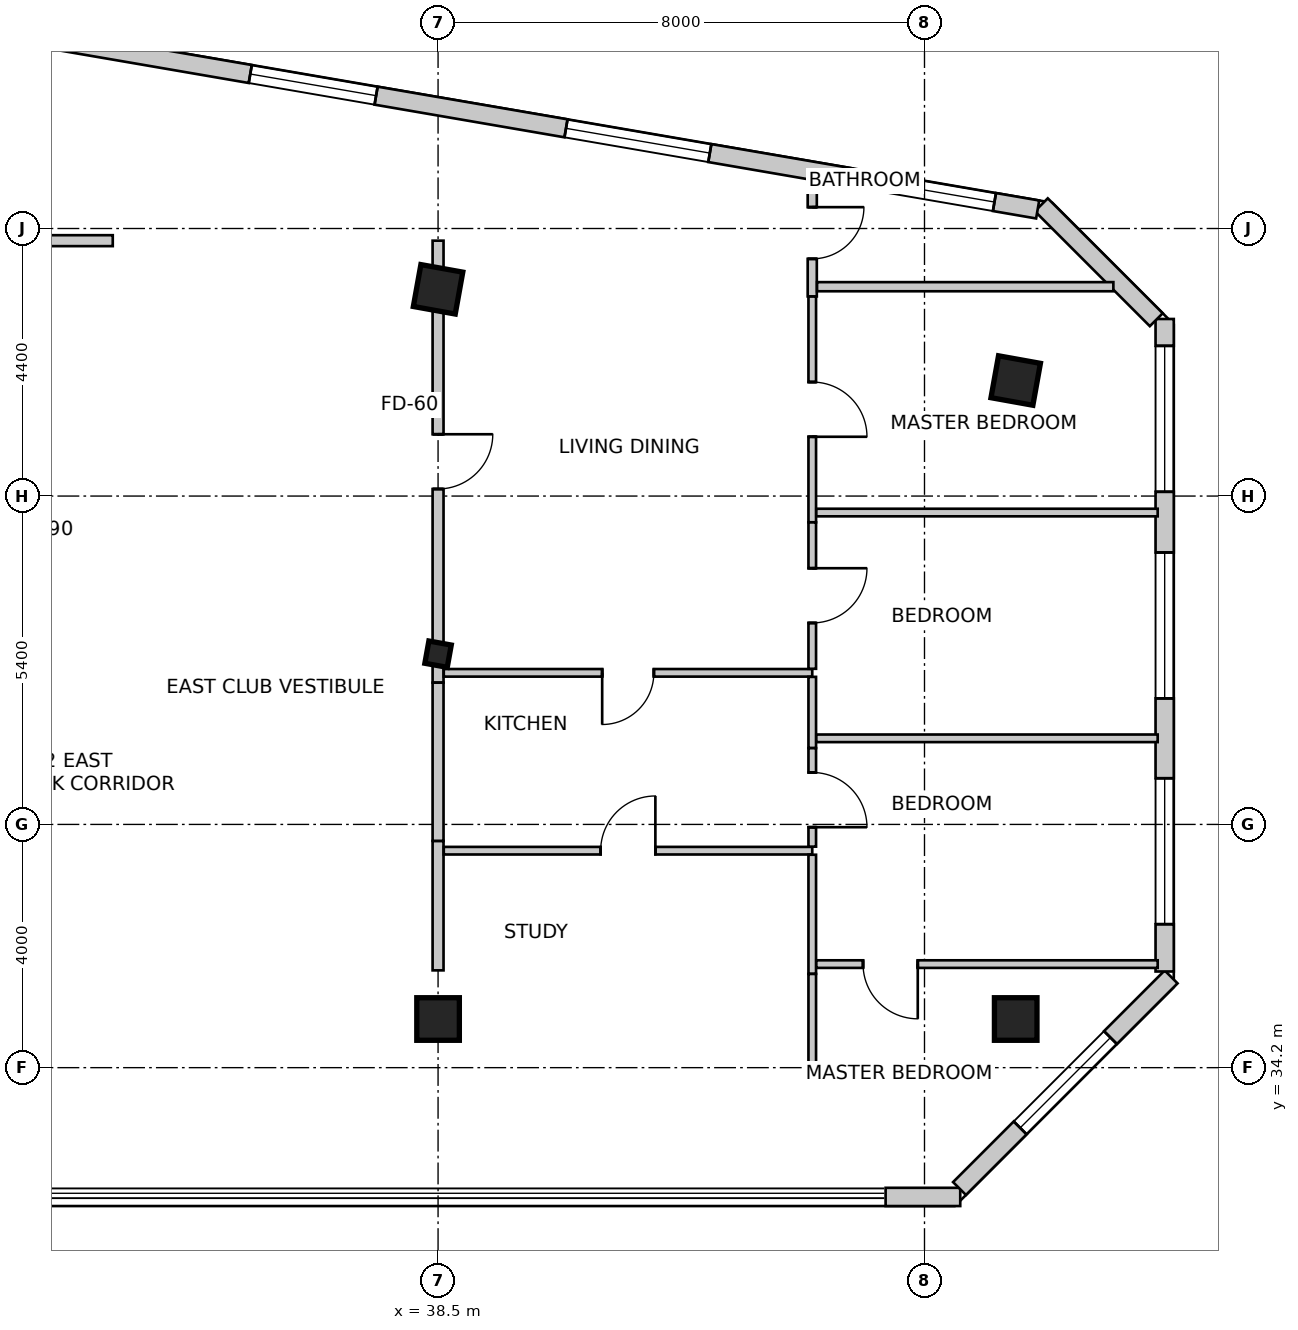
"""IFC4 building model, lengths in metres.
Left out: names, types, materials, properties, quantities, classifications, styles, units other than length and angle.
Written with IfcOpenShell. Run it as: python <this file> out.ifc"""

import sys

from ifc_helpers import new_model, si_unit, direction, frame, frame_2d, origin, origin_2d, place, context, subcontext, project, spatial, rectangle, i_section, extrude, source, transform, mapped, element, fill, save


model = new_model("IFC4")
c1 = context("Model", 3, precision=1e-05, world=origin(), true_north=direction((0.0, 1.0)))
c2 = subcontext(c1, "Body", "Model", "MODEL_VIEW")
j1 = project(units=[si_unit("LENGTHUNIT", "METRE"), si_unit("PLANEANGLEUNIT", "RADIAN")], contexts=[c1])
p1 = place(None, origin())
s1 = spatial("IfcSite", under=j1, at=p1, CompositionType="ELEMENT")
p2 = place(p1, origin())
s2 = spatial("IfcBuilding", under=s1, at=p2, CompositionType="ELEMENT")
p3 = place(p2, frame((0.0, 0.0, 207.9)))
s3 = spatial("IfcBuildingStorey", under=s2, at=p3, CompositionType="ELEMENT", Elevation=207.9)
m1 = source(origin(), c2, "Body", "SweptSolid", [
    extrude(rectangle(XDim=0.7, YDim=0.7, at=origin_2d()), origin(), (0.0, 0.0, 1.0), 3.5),
])
for number, where, z_axis, x_axis in (
    (1, (38.5, 47.0, 0.0), (0.0, 0.0, 1.0), (0.984, -0.177, 0.0)),
    (2, (48.0, 45.5, 0.0), (0.0, 0.0, 1.0), (0.984, -0.177, 0.0)),
    (3, (38.5, 35.0, 0.0), (0.0, 0.0, 1.0), (1.0, 0.0, 0.0)),
    (4, (48.0, 35.0, 0.0), (0.0, 0.0, 1.0), (1.0, 0.0, 0.0)),
):
    element("IfcColumn", number, at=place(p3, frame(where, z_axis=z_axis, x_axis=x_axis)), inside=s3, PredefinedType="COLUMN", context=c2, shape_type="MappedRepresentation", body=[
        mapped(m1, transform((0.0, 0.0, 0.0), scale=1.0)),
    ])
m2 = source(origin(), c2, "Body", "SweptSolid", [
    extrude(i_section(OverallWidth=0.374, OverallDepth=0.372, WebThickness=0.016, FlangeThickness=0.026, FilletRadius=0.015, at=origin_2d()), origin(), (0.0, 0.0, 1.0), 3.5),
])
p4 = place(p3, frame((38.5, 41.0, 0.0), z_axis=(0.0, 0.0, 1.0), x_axis=(0.984195607969, -0.17708474032, 0.0)))
e5 = element("IfcColumn", 5, at=p4, inside=s3, PredefinedType="COLUMN", context=c2, shape_type="MappedRepresentation", body=[
    mapped(m2, transform((0.0, 0.0, 0.0), scale=1.0)),
])
p5 = place(p3, frame((45.86, 32.074, 0.0), z_axis=(0.0, 0.0, 1.0), x_axis=(1.0, 0.0, 0.0)))
e6 = element("IfcWall", 6, at=p5, inside=s3, PredefinedType="SOLIDWALL", context=c2, shape_type="SweptSolid", body=[
    extrude(rectangle(XDim=1.228, YDim=0.3, at=frame_2d((0.614, 0.0))), origin(), (0.0, 0.0, 1.0), 3.2),
])
p6 = place(p3, frame((47.076, 32.212, 0.0), z_axis=(0.0, 0.0, 1.0), x_axis=(0.707106781187, 0.707106781187, 0.0)))
e7 = element("IfcWall", 7, at=p6, inside=s3, PredefinedType="SOLIDWALL", context=c2, shape_type="SweptSolid", body=[
    extrude(rectangle(XDim=4.922, YDim=0.3, at=frame_2d((2.461, 0.0))), origin(), (0.0, 0.0, 1.0), 3.2),
])
m3 = source(origin(), c2, "Body", "SweptSolid", [
    extrude(rectangle(XDim=2.1, YDim=2.0, at=frame_2d((1.05, 1.0))), frame((0.0, 0.16, 0.0), z_axis=(0.0, -1.0, 0.0), x_axis=(1.0, 0.0, 0.0)), (0.0, 0.0, 1.0), 0.32),
])
p7 = place(p6, frame((1.411, 0.0, 0.85)))
e8 = element("IfcOpeningElement", 8, at=p7, cuts=e7, PredefinedType="OPENING", context=c2, shape_type="MappedRepresentation", body=[
    mapped(m3, transform((0.0, 0.0, 0.0), scale=1.0)),
])
p8 = place(p3, frame((50.45, 35.781, 0.0), z_axis=(0.0, 0.0, 1.0), x_axis=(0.0, 1.0, 0.0)))
e9 = element("IfcWall", 9, at=p8, inside=s3, PredefinedType="SOLIDWALL", context=c2, shape_type="SweptSolid", body=[
    extrude(rectangle(XDim=10.731, YDim=0.3, at=frame_2d((5.365, 0.0))), origin(), (0.0, 0.0, 1.0), 3.2),
])
m4 = source(origin(), c2, "Body", "SweptSolid", [
    extrude(rectangle(XDim=2.4, YDim=2.2, at=frame_2d((1.2, 1.1))), frame((0.0, 0.16, 0.0), z_axis=(0.0, -1.0, 0.0), x_axis=(1.0, 0.0, 0.0)), (0.0, 0.0, 1.0), 0.32),
])
p9 = place(p8, frame((0.778, 0.0, 0.85)))
e10 = element("IfcOpeningElement", 10, at=p9, cuts=e9, PredefinedType="OPENING", context=c2, shape_type="MappedRepresentation", body=[
    mapped(m4, transform((0.0, 0.0, 0.0), scale=1.0)),
])
p10 = place(p8, frame((4.491, 0.0, 0.85)))
e11 = element("IfcOpeningElement", 11, at=p10, cuts=e9, PredefinedType="OPENING", context=c2, shape_type="MappedRepresentation", body=[
    mapped(m4, transform((0.0, 0.0, 0.0), scale=1.0)),
])
p11 = place(p8, frame((7.889, 0.0, 0.85)))
e12 = element("IfcOpeningElement", 12, at=p11, cuts=e9, PredefinedType="OPENING", context=c2, shape_type="MappedRepresentation", body=[
    mapped(m4, transform((0.0, 0.0, 0.0), scale=1.0)),
])
p12 = place(p3, frame((50.312, 46.5, 0.0), z_axis=(0.0, 0.0, 1.0), x_axis=(-0.707106781187, 0.707106781187, 0.0)))
e13 = element("IfcWall", 13, at=p12, inside=s3, PredefinedType="SOLIDWALL", context=c2, shape_type="SweptSolid", body=[
    extrude(rectangle(XDim=2.673, YDim=0.3, at=frame_2d((1.337, 0.0))), origin(), (0.0, 0.0, 1.0), 3.2),
])
p13 = place(p3, frame((48.361, 48.313, 0.0), z_axis=(0.0, 0.0, 1.0), x_axis=(-0.985523113069, 0.169541126597, 0.0)))
e14 = element("IfcWall", 14, at=p13, inside=s3, PredefinedType="SOLIDWALL", context=c2, shape_type="SweptSolid", body=[
    extrude(rectangle(XDim=26.866, YDim=0.3, at=frame_2d((13.433, 0.0))), origin(), (0.0, 0.0, 1.0), 3.2),
])
p14 = place(p13, frame((0.721, 0.0, 0.85)))
e15 = element("IfcOpeningElement", 15, at=p14, cuts=e14, PredefinedType="OPENING", context=c2, shape_type="MappedRepresentation", body=[
    mapped(m4, transform((0.0, 0.0, 0.0), scale=1.0)),
])
p15 = place(p13, frame((5.471, 0.0, 0.85)))
e16 = element("IfcOpeningElement", 16, at=p15, cuts=e14, PredefinedType="OPENING", context=c2, shape_type="MappedRepresentation", body=[
    mapped(m4, transform((0.0, 0.0, 0.0), scale=1.0)),
])
p16 = place(p13, frame((11.04, 0.0, 0.85)))
e17 = element("IfcOpeningElement", 17, at=p16, cuts=e14, PredefinedType="OPENING", context=c2, shape_type="MappedRepresentation", body=[
    mapped(m3, transform((0.0, 0.0, 0.0), scale=1.0)),
])
p17 = place(p13, frame((16.308, 0.0, 0.85)))
e18 = element("IfcOpeningElement", 18, at=p17, cuts=e14, PredefinedType="OPENING", context=c2, shape_type="MappedRepresentation", body=[
    mapped(m4, transform((0.0, 0.0, 0.0), scale=1.0)),
])
p18 = place(p13, frame((21.368, 0.0, 0.85)))
e19 = element("IfcOpeningElement", 19, at=p18, cuts=e14, PredefinedType="OPENING", context=c2, shape_type="MappedRepresentation", body=[
    mapped(m4, transform((0.0, 0.0, 0.0), scale=1.0)),
])
m5 = source(origin(), c2, "Body", "SweptSolid", [
    extrude(rectangle(XDim=1.5, YDim=1.8, at=frame_2d((0.75, 0.9))), frame((0.0, 0.16, 0.0), z_axis=(0.0, -1.0, 0.0), x_axis=(1.0, 0.0, 0.0)), (0.0, 0.0, 1.0), 0.32),
])
p19 = place(p13, frame((24.983, 0.0, 0.85)))
e20 = element("IfcOpeningElement", 20, at=p19, cuts=e14, PredefinedType="OPENING", context=c2, shape_type="MappedRepresentation", body=[
    mapped(m5, transform((0.0, 0.0, 0.0), scale=1.0)),
])
p20 = place(p3, frame((28.362, 47.8, 0.0), z_axis=(0.0, 0.0, 1.0), x_axis=(1.0, 0.0, 0.0)))
e21 = element("IfcWall", 21, at=p20, inside=s3, PredefinedType="PARTITIONING", context=c2, shape_type="SweptSolid", body=[
    extrude(rectangle(XDim=4.788, YDim=0.18, at=frame_2d((2.394, 0.0))), origin(), (0.0, 0.0, 1.0), 2.729),
])
m6 = source(origin(), c2, "Body", "SweptSolid", [
    extrude(rectangle(XDim=0.85, YDim=2.15, at=frame_2d((0.425, 1.075))), frame((0.0, 0.1, 0.0), z_axis=(0.0, -1.0, 0.0), x_axis=(1.0, 0.0, 0.0)), (0.0, 0.0, 1.0), 0.2),
])
p21 = place(p20, frame((0.401, 0.0, 0.0)))
e22 = element("IfcOpeningElement", 22, at=p21, cuts=e21, PredefinedType="OPENING", context=c2, shape_type="MappedRepresentation", body=[
    mapped(m6, transform((0.0, 0.0, 0.0), scale=1.0)),
])
p22 = place(p3, frame((38.5, 37.928, 0.0), z_axis=(0.0, 0.0, 1.0), x_axis=(0.0, -1.0, 0.0)))
e23 = element("IfcWall", 23, at=p22, inside=s3, PredefinedType="PARTITIONING", context=c2, shape_type="SweptSolid", body=[
    extrude(rectangle(XDim=2.128, YDim=0.18, at=frame_2d((1.064, 0.0))), origin(), (0.0, 0.0, 1.0), 2.242),
])
p23 = place(p3, frame((38.5, 47.8, 0.0), z_axis=(0.0, 0.0, 1.0), x_axis=(0.0, -1.0, 0.0)))
e24 = element("IfcWall", 24, at=p23, inside=s3, PredefinedType="PARTITIONING", context=c2, shape_type="SweptSolid", body=[
    extrude(rectangle(XDim=7.267, YDim=0.18, at=frame_2d((3.634, 0.0))), origin(), (0.0, 0.0, 1.0), 2.242),
])
m7 = source(origin(), c2, "Body", "SweptSolid", [
    extrude(rectangle(XDim=0.9, YDim=2.15, at=frame_2d((0.45, 1.075))), frame((0.0, 0.1, 0.0), z_axis=(0.0, -1.0, 0.0), x_axis=(1.0, 0.0, 0.0)), (0.0, 0.0, 1.0), 0.2),
])
p24 = place(p23, frame((3.184, 0.0, 0.0)))
e25 = element("IfcOpeningElement", 25, at=p24, cuts=e24, PredefinedType="OPENING", context=c2, shape_type="MappedRepresentation", body=[
    mapped(m7, transform((0.0, 0.0, 0.0), scale=1.0)),
])
p25 = place(p3, frame((38.5, 40.531, 0.0), z_axis=(0.0, 0.0, 1.0), x_axis=(0.0, -1.0, 0.0)))
e26 = element("IfcWall", 26, at=p25, inside=s3, PredefinedType="PARTITIONING", context=c2, shape_type="SweptSolid", body=[
    extrude(rectangle(XDim=2.601, YDim=0.18, at=frame_2d((1.301, 0.0))), origin(), (0.0, 0.0, 1.0), 2.242),
])
p26 = place(p3, frame((38.594, 37.768, 0.0), z_axis=(0.0, 0.0, 1.0), x_axis=(1.0, 0.0, 0.0)))
e27 = element("IfcWall", 27, at=p26, inside=s3, PredefinedType="PARTITIONING", context=c2, shape_type="SweptSolid", body=[
    extrude(rectangle(XDim=6.06, YDim=0.125, at=frame_2d((3.03, 0.0))), origin(), (0.0, 0.0, 1.0), 2.242),
])
m8 = source(origin(), c2, "Body", "SweptSolid", [
    extrude(rectangle(XDim=0.9, YDim=2.15, at=frame_2d((0.45, 1.075))), frame((0.0, 0.073, 0.0), z_axis=(0.0, -1.0, 0.0), x_axis=(1.0, 0.0, 0.0)), (0.0, 0.0, 1.0), 0.145),
])
p27 = place(p26, frame((2.58, 0.0, 0.0)))
e28 = element("IfcOpeningElement", 28, at=p27, cuts=e27, PredefinedType="OPENING", context=c2, shape_type="MappedRepresentation", body=[
    mapped(m8, transform((0.0, 0.0, 0.0), scale=1.0)),
])
p28 = place(p3, frame((44.654, 37.701, 0.0), z_axis=(0.0, 0.0, 1.0), x_axis=(0.0, -1.0, 0.0)))
e29 = element("IfcWall", 29, at=p28, inside=s3, PredefinedType="PARTITIONING", context=c2, shape_type="SweptSolid", body=[
    extrude(rectangle(XDim=1.958, YDim=0.125, at=frame_2d((0.979, 0.0))), origin(), (0.0, 0.0, 1.0), 2.729),
])
p29 = place(p3, frame((44.654, 35.741, 0.0), z_axis=(0.0, 0.0, 1.0), x_axis=(0.0, -1.0, 0.0)))
e30 = element("IfcWall", 30, at=p29, inside=s3, PredefinedType="PARTITIONING", context=c2, shape_type="SweptSolid", body=[
    extrude(rectangle(XDim=1.573, YDim=0.125, at=frame_2d((0.787, 0.0))), origin(), (0.0, 0.0, 1.0), 2.492),
])
p30 = place(p3, frame((44.654, 40.693, 0.0), z_axis=(0.0, 0.0, 1.0), x_axis=(-1.0, 0.0, 0.0)))
e31 = element("IfcWall", 31, at=p30, inside=s3, PredefinedType="PARTITIONING", context=c2, shape_type="SweptSolid", body=[
    extrude(rectangle(XDim=6.06, YDim=0.125, at=frame_2d((3.03, 0.0))), origin(), (0.0, 0.0, 1.0), 2.242),
])
m9 = source(origin(), c2, "Body", "SweptSolid", [
    extrude(rectangle(XDim=0.85, YDim=2.15, at=frame_2d((0.425, 1.075))), frame((0.0, 0.073, 0.0), z_axis=(0.0, -1.0, 0.0), x_axis=(1.0, 0.0, 0.0)), (0.0, 0.0, 1.0), 0.145),
])
p31 = place(p30, frame((2.605, 0.0, 0.0)))
e32 = element("IfcOpeningElement", 32, at=p31, cuts=e31, PredefinedType="OPENING", context=c2, shape_type="MappedRepresentation", body=[
    mapped(m9, transform((0.0, 0.0, 0.0), scale=1.0)),
])
p32 = place(p3, frame((44.654, 48.834, 0.0), z_axis=(0.0, 0.0, 1.0), x_axis=(0.0, -1.0, 0.0)))
e33 = element("IfcWall", 33, at=p32, inside=s3, PredefinedType="PARTITIONING", context=c2, shape_type="SweptSolid", body=[
    extrude(rectangle(XDim=1.951, YDim=0.15, at=frame_2d((0.976, 0.0))), origin(), (0.0, 0.0, 1.0), 3.2),
])
m10 = source(origin(), c2, "Body", "SweptSolid", [
    extrude(rectangle(XDim=0.85, YDim=2.15, at=frame_2d((0.425, 1.075))), frame((0.0, 0.085, 0.0), z_axis=(0.0, -1.0, 0.0), x_axis=(1.0, 0.0, 0.0)), (0.0, 0.0, 1.0), 0.17),
])
p33 = place(p32, frame((0.483, 0.0, 0.0)))
e34 = element("IfcOpeningElement", 34, at=p33, cuts=e33, PredefinedType="OPENING", context=c2, shape_type="MappedRepresentation", body=[
    mapped(m10, transform((0.0, 0.0, 0.0), scale=1.0)),
])
p34 = place(p3, frame((44.654, 46.881, 0.0), z_axis=(0.0, 0.0, 1.0), x_axis=(0.0, -1.0, 0.0)))
e35 = element("IfcWall", 35, at=p34, inside=s3, PredefinedType="PARTITIONING", context=c2, shape_type="SweptSolid", body=[
    extrude(rectangle(XDim=3.712, YDim=0.125, at=frame_2d((1.856, 0.0))), origin(), (0.0, 0.0, 1.0), 2.492),
])
p35 = place(p34, frame((1.406, 0.0, 0.0)))
e36 = element("IfcOpeningElement", 36, at=p35, cuts=e35, PredefinedType="OPENING", context=c2, shape_type="MappedRepresentation", body=[
    mapped(m8, transform((0.0, 0.0, 0.0), scale=1.0)),
])
p36 = place(p3, frame((44.654, 43.167, 0.0), z_axis=(0.0, 0.0, 1.0), x_axis=(0.0, -1.0, 0.0)))
e37 = element("IfcWall", 37, at=p36, inside=s3, PredefinedType="PARTITIONING", context=c2, shape_type="SweptSolid", body=[
    extrude(rectangle(XDim=2.407, YDim=0.125, at=frame_2d((1.204, 0.0))), origin(), (0.0, 0.0, 1.0), 2.729),
])
p37 = place(p36, frame((0.754, 0.0, 0.0)))
e38 = element("IfcOpeningElement", 38, at=p37, cuts=e37, PredefinedType="OPENING", context=c2, shape_type="MappedRepresentation", body=[
    mapped(m8, transform((0.0, 0.0, 0.0), scale=1.0)),
])
p38 = place(p3, frame((44.654, 40.626, 0.0), z_axis=(0.0, 0.0, 1.0), x_axis=(0.0, -1.0, 0.0)))
e39 = element("IfcWall", 39, at=p38, inside=s3, PredefinedType="PARTITIONING", context=c2, shape_type="SweptSolid", body=[
    extrude(rectangle(XDim=1.17, YDim=0.125, at=frame_2d((0.585, 0.0))), origin(), (0.0, 0.0, 1.0), 3.2),
])
p39 = place(p3, frame((44.654, 39.454, 0.0), z_axis=(0.0, 0.0, 1.0), x_axis=(0.0, -1.0, 0.0)))
e40 = element("IfcWall", 40, at=p39, inside=s3, PredefinedType="PARTITIONING", context=c2, shape_type="SweptSolid", body=[
    extrude(rectangle(XDim=1.62, YDim=0.125, at=frame_2d((0.81, 0.0))), origin(), (0.0, 0.0, 1.0), 2.869),
])
p40 = place(p39, frame((0.4, 0.0, 0.0)))
e41 = element("IfcOpeningElement", 41, at=p40, cuts=e40, PredefinedType="OPENING", context=c2, shape_type="MappedRepresentation", body=[
    mapped(m8, transform((0.0, 0.0, 0.0), scale=1.0)),
])
p41 = place(p3, frame((49.606, 47.043, 0.0), z_axis=(0.0, 0.0, 1.0), x_axis=(-1.0, 0.0, 0.0)))
e42 = element("IfcWall", 42, at=p41, inside=s3, PredefinedType="PARTITIONING", context=c2, shape_type="SweptSolid", body=[
    extrude(rectangle(XDim=4.873, YDim=0.15, at=frame_2d((2.437, 0.0))), origin(), (0.0, 0.0, 1.0), 3.2),
])
for number, where, z_axis, x_axis in (
    (43, (50.335, 43.329, 0.0), (0.0, 0.0, 1.0), (-1.0, 0.0, 0.0)),
    (44, (50.335, 39.616, 0.0), (0.0, 0.0, 1.0), (-1.0, 0.0, 0.0)),
):
    element("IfcWall", number, at=place(p3, frame(where, z_axis=z_axis, x_axis=x_axis)), inside=s3, PredefinedType="PARTITIONING", context=c2, shape_type="SweptSolid", body=[
        extrude(rectangle(XDim=5.615, YDim=0.125, at=frame_2d((2.807, 0.0))), origin(), (0.0, 0.0, 1.0), 2.716),
    ])
p42 = place(p3, frame((50.335, 35.903, 0.0), z_axis=(0.0, 0.0, 1.0), x_axis=(-1.0, 0.0, 0.0)))
e45 = element("IfcWall", 45, at=p42, inside=s3, PredefinedType="PARTITIONING", context=c2, shape_type="SweptSolid", body=[
    extrude(rectangle(XDim=5.615, YDim=0.125, at=frame_2d((2.807, 0.0))), origin(), (0.0, 0.0, 1.0), 2.716),
])
p43 = place(p42, frame((3.946, 0.0, 0.0)))
e46 = element("IfcOpeningElement", 46, at=p43, cuts=e45, PredefinedType="OPENING", context=c2, shape_type="MappedRepresentation", body=[
    mapped(m8, transform((0.0, 0.0, 0.0), scale=1.0)),
])
m11 = source(origin(), c2, "Body", "SweptSolid", [
    extrude(rectangle(XDim=2.1, YDim=2.0, at=frame_2d((1.05, 1.0))), frame((0.0, -0.015, 0.0), z_axis=(0.0, -1.0, 0.0), x_axis=(1.0, 0.0, 0.0)), (0.0, 0.0, 1.0), 0.06),
])
p44 = place(p7, origin())
e47 = element("IfcWindow", 47, at=p44, inside=s3, PartitioningType="SINGLE_PANEL", PredefinedType="WINDOW", context=c2, shape_type="MappedRepresentation", body=[
    mapped(m11, transform((0.0, 0.0, 0.0), scale=1.0)),
])
fill(e8, e47)
m12 = source(origin(), c2, "Body", "SweptSolid", [
    extrude(rectangle(XDim=2.4, YDim=2.2, at=frame_2d((1.2, 1.1))), frame((0.0, -0.015, 0.0), z_axis=(0.0, -1.0, 0.0), x_axis=(1.0, 0.0, 0.0)), (0.0, 0.0, 1.0), 0.06),
])
p45 = place(p9, origin())
e48 = element("IfcWindow", 48, at=p45, inside=s3, PartitioningType="SINGLE_PANEL", PredefinedType="WINDOW", context=c2, shape_type="MappedRepresentation", body=[
    mapped(m12, transform((0.0, 0.0, 0.0), scale=1.0)),
])
fill(e10, e48)
p46 = place(p10, origin())
e49 = element("IfcWindow", 49, at=p46, inside=s3, PartitioningType="SINGLE_PANEL", PredefinedType="WINDOW", context=c2, shape_type="MappedRepresentation", body=[
    mapped(m12, transform((0.0, 0.0, 0.0), scale=1.0)),
])
fill(e11, e49)
p47 = place(p11, origin())
e50 = element("IfcWindow", 50, at=p47, inside=s3, PartitioningType="SINGLE_PANEL", PredefinedType="WINDOW", context=c2, shape_type="MappedRepresentation", body=[
    mapped(m12, transform((0.0, 0.0, 0.0), scale=1.0)),
])
fill(e12, e50)
p48 = place(p14, origin())
e51 = element("IfcWindow", 51, at=p48, inside=s3, PartitioningType="SINGLE_PANEL", PredefinedType="WINDOW", context=c2, shape_type="MappedRepresentation", body=[
    mapped(m12, transform((0.0, 0.0, 0.0), scale=1.0)),
])
fill(e15, e51)
p49 = place(p15, origin())
e52 = element("IfcWindow", 52, at=p49, inside=s3, PartitioningType="SINGLE_PANEL", PredefinedType="WINDOW", context=c2, shape_type="MappedRepresentation", body=[
    mapped(m12, transform((0.0, 0.0, 0.0), scale=1.0)),
])
fill(e16, e52)
p50 = place(p16, origin())
e53 = element("IfcWindow", 53, at=p50, inside=s3, PartitioningType="SINGLE_PANEL", PredefinedType="WINDOW", context=c2, shape_type="MappedRepresentation", body=[
    mapped(m11, transform((0.0, 0.0, 0.0), scale=1.0)),
])
fill(e17, e53)
m13 = source(origin(), c2, "Body", "SweptSolid", [
    extrude(rectangle(XDim=0.9, YDim=2.15, at=frame_2d((0.45, 1.075))), frame((0.0, 0.025, 0.0), z_axis=(0.0, -1.0, 0.0), x_axis=(1.0, 0.0, 0.0)), (0.0, 0.0, 1.0), 0.05),
])
p51 = place(p27, origin())
e54 = element("IfcDoor", 54, at=p51, inside=s3, OperationType="SINGLE_SWING_RIGHT", PredefinedType="DOOR", context=c2, shape_type="MappedRepresentation", body=[
    mapped(m13, transform((0.0, 0.0, 0.0), scale=1.0)),
])
fill(e28, e54)
m14 = source(origin(), c2, "Body", "SweptSolid", [
    extrude(rectangle(XDim=0.9, YDim=2.15, at=frame_2d((0.45, 1.075))), frame((0.0, 0.025, 0.0), z_axis=(0.0, -1.0, 0.0), x_axis=(1.0, 0.0, 0.0)), (0.0, 0.0, 1.0), 0.05),
])
p52 = place(p24, origin())
e55 = element("IfcDoor", 55, at=p52, inside=s3, OperationType="SINGLE_SWING_LEFT", PredefinedType="DOOR", context=c2, shape_type="MappedRepresentation", body=[
    mapped(m14, transform((0.0, 0.0, 0.0), scale=1.0)),
])
fill(e25, e55)
m15 = source(origin(), c2, "Body", "SweptSolid", [
    extrude(rectangle(XDim=0.85, YDim=2.15, at=frame_2d((0.425, 1.075))), frame((0.0, 0.025, 0.0), z_axis=(0.0, -1.0, 0.0), x_axis=(1.0, 0.0, 0.0)), (0.0, 0.0, 1.0), 0.05),
])
p53 = place(p31, origin())
e56 = element("IfcDoor", 56, at=p53, inside=s3, OperationType="SINGLE_SWING_RIGHT", PredefinedType="DOOR", context=c2, shape_type="MappedRepresentation", body=[
    mapped(m15, transform((0.0, 0.0, 0.0), scale=1.0)),
])
fill(e32, e56)
p54 = place(p33, origin())
e57 = element("IfcDoor", 57, at=p54, inside=s3, OperationType="SINGLE_SWING_LEFT", PredefinedType="DOOR", context=c2, shape_type="MappedRepresentation", body=[
    mapped(m15, transform((0.0, 0.0, 0.0), scale=1.0)),
])
fill(e34, e57)
p55 = place(p35, origin())
e58 = element("IfcDoor", 58, at=p55, inside=s3, OperationType="SINGLE_SWING_RIGHT", PredefinedType="DOOR", context=c2, shape_type="MappedRepresentation", body=[
    mapped(m13, transform((0.0, 0.0, 0.0), scale=1.0)),
])
fill(e36, e58)
p56 = place(p37, origin())
e59 = element("IfcDoor", 59, at=p56, inside=s3, OperationType="SINGLE_SWING_LEFT", PredefinedType="DOOR", context=c2, shape_type="MappedRepresentation", body=[
    mapped(m13, transform((0.0, 0.0, 0.0), scale=1.0)),
])
fill(e38, e59)
p57 = place(p40, origin())
e60 = element("IfcDoor", 60, at=p57, inside=s3, OperationType="SINGLE_SWING_RIGHT", PredefinedType="DOOR", context=c2, shape_type="MappedRepresentation", body=[
    mapped(m13, transform((0.0, 0.0, 0.0), scale=1.0)),
])
fill(e41, e60)
p58 = place(p43, origin())
e61 = element("IfcDoor", 61, at=p58, inside=s3, OperationType="SINGLE_SWING_LEFT", PredefinedType="DOOR", context=c2, shape_type="MappedRepresentation", body=[
    mapped(m13, transform((0.0, 0.0, 0.0), scale=1.0)),
])
fill(e46, e61)
save(model, sys.argv[1])
